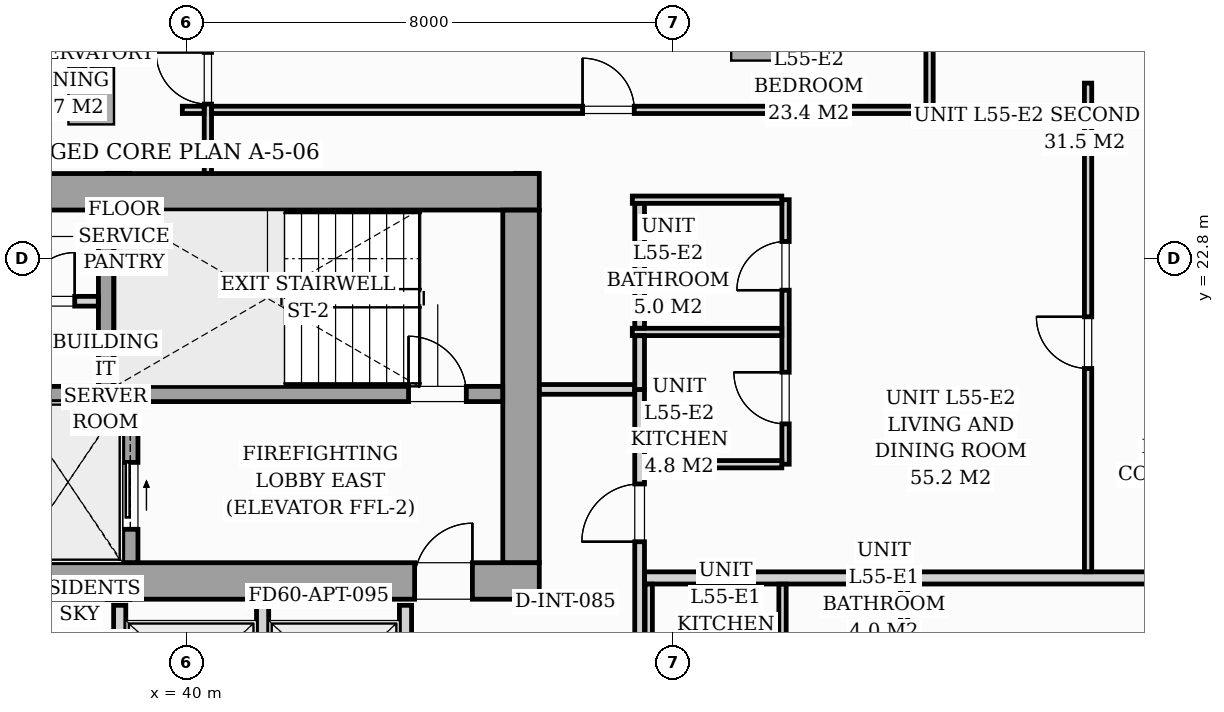
"""IFC4 building model, lengths in metres.
Left out: names, types, materials, properties, quantities, classifications, styles, units other than length and angle.
Written with IfcOpenShell. Run it as: python <this file> out.ifc"""

import sys

from ifc_helpers import new_model, si_unit, direction, frame, frame_2d, origin, origin_2d, place, context, subcontext, project, spatial, rectangle, i_section, extrude, source, transform, mapped, element, fill, save


model = new_model("IFC4")
c1 = context("Model", 3, precision=1e-05, world=origin(), true_north=direction((0.0, 1.0)))
c2 = subcontext(c1, "Body", "Model", "MODEL_VIEW")
j1 = project(units=[si_unit("LENGTHUNIT", "METRE"), si_unit("PLANEANGLEUNIT", "RADIAN")], contexts=[c1])
p1 = place(None, origin())
s1 = spatial("IfcSite", under=j1, at=p1, CompositionType="ELEMENT")
p2 = place(p1, origin())
s2 = spatial("IfcBuilding", under=s1, at=p2, CompositionType="ELEMENT")
p3 = place(p2, frame((0.0, 0.0, 192.2)))
s3 = spatial("IfcBuildingStorey", under=s2, at=p3, CompositionType="ELEMENT", Elevation=192.2)
m1 = source(origin(), c2, "Body", "SweptSolid", [
    extrude(i_section(OverallWidth=0.416, OverallDepth=0.446, WebThickness=0.039, FlangeThickness=0.063, FilletRadius=0.018, at=origin_2d()), origin(), (0.0, 0.0, 1.0), 3.196),
])
for number, where, z_axis, x_axis in (
    (1, (38.88, 17.4, 0.002), (0.0, 0.0, 1.0), (1.0, 0.0, 0.0)),
    (2, (45.6, 17.4, 0.002), (0.0, 0.0, 1.0), (1.0, 0.0, 0.0)),
    (3, (38.88, 24.0, 0.002), (0.0, 0.0, 1.0), (1.0, 0.0, 0.0)),
    (4, (45.6, 24.0, 0.002), (0.0, 0.0, 1.0), (1.0, 0.0, 0.0)),
):
    element("IfcColumn", number, at=place(p3, frame(where, z_axis=z_axis, x_axis=x_axis)), inside=s3, PredefinedType="PILASTER", context=c2, shape_type="MappedRepresentation", body=[
        mapped(m1, transform((0.0, 0.0, 0.0), scale=1.0)),
    ])
m2 = source(origin(), c2, "Body", "SweptSolid", [
    extrude(rectangle(XDim=0.75, YDim=0.95, at=origin_2d()), origin(), (0.0, 0.0, 1.0), 3.196),
])
for number, where, z_axis, x_axis in (
    (5, (38.431, 25.483, 0.002), (0.0, 0.0, 1.0), (0.995, 0.096, 0.0)),
    (6, (49.331, 26.533, 0.002), (0.0, 0.0, 1.0), (0.995, 0.096, 0.0)),
):
    element("IfcColumn", number, at=place(p3, frame(where, z_axis=z_axis, x_axis=x_axis)), inside=s3, PredefinedType="COLUMN", context=c2, shape_type="MappedRepresentation", body=[
        mapped(m2, transform((0.0, 0.0, 0.0), scale=1.0)),
    ])
p4 = place(p3, frame((26.2, 17.5, 0.0), z_axis=(0.0, 0.0, 1.0), x_axis=(1.0, 0.0, 0.0)))
e7 = element("IfcWall", 7, at=p4, inside=s3, PredefinedType="SHEAR", context=c2, shape_type="SweptSolid", body=[
    extrude(rectangle(XDim=19.6, YDim=0.6, at=frame_2d((9.8, 0.0))), origin(), (0.0, 0.0, 1.0), 3.2),
])
p5 = place(p4, frame((0.95, 0.0, 0.0)))
e8 = element("IfcOpeningElement", 8, at=p5, cuts=e7, PredefinedType="OPENING", context=c2, shape_type="SweptSolid", body=[
    extrude(rectangle(XDim=0.95, YDim=2.06, at=frame_2d((0.475, 1.03))), frame((0.0, 0.31, 0.0), z_axis=(0.0, -1.0, 0.0), x_axis=(1.0, 0.0, 0.0)), (0.0, 0.0, 1.0), 0.62),
])
p6 = place(p4, frame((9.38, 0.0, 0.0)))
e9 = element("IfcOpeningElement", 9, at=p6, cuts=e7, PredefinedType="OPENING", context=c2, shape_type="SweptSolid", body=[
    extrude(rectangle(XDim=0.85, YDim=2.0, at=frame_2d((0.425, 1.0))), frame((0.0, 0.31, 0.0), z_axis=(0.0, -1.0, 0.0), x_axis=(1.0, 0.0, 0.0)), (0.0, 0.0, 1.0), 0.62),
])
p7 = place(p4, frame((17.55, 0.0, 0.0)))
e10 = element("IfcOpeningElement", 10, at=p7, cuts=e7, PredefinedType="OPENING", context=c2, shape_type="SweptSolid", body=[
    extrude(rectangle(XDim=0.95, YDim=2.06, at=frame_2d((0.475, 1.03))), frame((0.0, 0.31, 0.0), z_axis=(0.0, -1.0, 0.0), x_axis=(1.0, 0.0, 0.0)), (0.0, 0.0, 1.0), 0.62),
])
p8 = place(p3, frame((26.2, 23.9, 0.0), z_axis=(0.0, 0.0, 1.0), x_axis=(1.0, 0.0, 0.0)))
e11 = element("IfcWall", 11, at=p8, inside=s3, PredefinedType="SHEAR", context=c2, shape_type="SweptSolid", body=[
    extrude(rectangle(XDim=19.6, YDim=0.6, at=frame_2d((9.8, 0.0))), origin(), (0.0, 0.0, 1.0), 3.2),
])
p9 = place(p3, frame((45.5, 17.802, 0.0), z_axis=(0.0, 0.0, 1.0), x_axis=(0.0, 1.0, 0.0)))
e12 = element("IfcWall", 12, at=p9, inside=s3, PredefinedType="SHEAR", context=c2, shape_type="SweptSolid", body=[
    extrude(rectangle(XDim=5.796, YDim=0.6, at=frame_2d((2.898, 0.0))), origin(), (0.0, 0.0, 1.0), 3.2),
])
p10 = place(p3, frame((37.05, 20.575, 0.0), z_axis=(0.0, 0.0, 1.0), x_axis=(1.0, 0.0, 0.0)))
e13 = element("IfcWall", 13, at=p10, inside=s3, PredefinedType="SOLIDWALL", context=c2, shape_type="SweptSolid", body=[
    extrude(rectangle(XDim=8.148, YDim=0.25, at=frame_2d((4.074, 0.0))), origin(), (0.0, 0.0, 1.0), 3.2),
])
p11 = place(p10, frame((6.6, 0.0, 0.0)))
e14 = element("IfcOpeningElement", 14, at=p11, cuts=e13, PredefinedType="OPENING", context=c2, shape_type="SweptSolid", body=[
    extrude(rectangle(XDim=0.95, YDim=2.06, at=frame_2d((0.475, 1.03))), frame((0.0, 0.135, 0.0), z_axis=(0.0, -1.0, 0.0), x_axis=(1.0, 0.0, 0.0)), (0.0, 0.0, 1.0), 0.27),
])
p12 = place(p3, frame((38.675, 20.702, 0.0), z_axis=(0.0, 0.0, 1.0), x_axis=(0.0, 1.0, 0.0)))
e15 = element("IfcWall", 15, at=p12, inside=s3, PredefinedType="SOLIDWALL", context=c2, shape_type="SweptSolid", body=[
    extrude(rectangle(XDim=2.896, YDim=0.25, at=frame_2d((1.448, 0.0))), origin(), (0.0, 0.0, 1.0), 3.2),
])
p13 = place(p3, frame((39.075, 17.802, 0.0), z_axis=(0.0, 0.0, 1.0), x_axis=(0.0, 1.0, 0.0)))
e16 = element("IfcWall", 16, at=p13, inside=s3, PredefinedType="SOLIDWALL", context=c2, shape_type="SweptSolid", body=[
    extrude(rectangle(XDim=2.646, YDim=0.25, at=frame_2d((1.323, 0.0))), origin(), (0.0, 0.0, 1.0), 3.2),
])
p14 = place(p13, frame((0.548, 0.0, 0.0)))
e17 = element("IfcOpeningElement", 17, at=p14, cuts=e16, PredefinedType="OPENING", context=c2, shape_type="SweptSolid", body=[
    extrude(rectangle(XDim=1.1, YDim=2.08, at=frame_2d((0.55, 1.04))), frame((0.0, 0.135, 0.0), z_axis=(0.0, -1.0, 0.0), x_axis=(1.0, 0.0, 0.0)), (0.0, 0.0, 1.0), 0.27),
])
p15 = place(p3, frame((33.452, 22.1, 0.0), z_axis=(0.0, 0.0, 1.0), x_axis=(1.0, 0.0, 0.0)))
e18 = element("IfcWall", 18, at=p15, inside=s3, PredefinedType="PARTITIONING", context=c2, shape_type="SweptSolid", body=[
    extrude(rectangle(XDim=5.096, YDim=0.16, at=frame_2d((2.548, 0.0))), origin(), (0.0, 0.0, 1.0), 2.94),
])
p16 = place(p15, frame((0.388, 0.0, 0.0)))
e19 = element("IfcOpeningElement", 19, at=p16, cuts=e18, PredefinedType="OPENING", context=c2, shape_type="SweptSolid", body=[
    extrude(rectangle(XDim=0.8, YDim=2.05, at=frame_2d((0.4, 1.025))), frame((0.0, 0.09, 0.0), z_axis=(0.0, -1.0, 0.0), x_axis=(1.0, 0.0, 0.0)), (0.0, 0.0, 1.0), 0.18),
])
p17 = place(p15, frame((2.148, 0.0, 0.0)))
e20 = element("IfcOpeningElement", 20, at=p17, cuts=e18, PredefinedType="OPENING", context=c2, shape_type="SweptSolid", body=[
    extrude(rectangle(XDim=0.8, YDim=2.05, at=frame_2d((0.4, 1.025))), frame((0.0, 0.09, 0.0), z_axis=(0.0, -1.0, 0.0), x_axis=(1.0, 0.0, 0.0)), (0.0, 0.0, 1.0), 0.18),
])
p18 = place(p15, frame((3.908, 0.0, 0.0)))
e21 = element("IfcOpeningElement", 21, at=p18, cuts=e18, PredefinedType="OPENING", context=c2, shape_type="SweptSolid", body=[
    extrude(rectangle(XDim=0.8, YDim=2.05, at=frame_2d((0.4, 1.025))), frame((0.0, 0.09, 0.0), z_axis=(0.0, -1.0, 0.0), x_axis=(1.0, 0.0, 0.0)), (0.0, 0.0, 1.0), 0.18),
])
for number, where, z_axis, x_axis in (
    (22, (38.9, 14.75, 0.0), (0.0, 0.0, 1.0), (0.0, 1.0, 0.0)),
    (23, (41.25, 14.75, 0.0), (0.0, 0.0, 1.0), (0.0, 1.0, 0.0)),
    (24, (43.6, 14.75, 0.0), (0.0, 0.0, 1.0), (0.0, 1.0, 0.0)),
):
    element("IfcWall", number, at=place(p3, frame(where, z_axis=z_axis, x_axis=x_axis)), inside=s3, PredefinedType="PARTITIONING", context=c2, shape_type="SweptSolid", body=[
        extrude(rectangle(XDim=2.35, YDim=0.2, at=frame_2d((1.175, 0.0))), origin(), (0.0, 0.0, 1.0), 2.94),
    ])
p19 = place(p3, frame((47.45, 13.362, 0.0), z_axis=(0.0, 0.0, 1.0), x_axis=(0.0, 1.0, 0.0)))
e25 = element("IfcWall", 25, at=p19, inside=s3, PredefinedType="PARTITIONING", context=c2, shape_type="SweptSolid", body=[
    extrude(rectangle(XDim=7.288, YDim=0.16, at=frame_2d((3.644, 0.0))), origin(), (0.0, 0.0, 1.0), 2.94),
])
p20 = place(p19, frame((0.493, 0.0, 0.0)))
e26 = element("IfcOpeningElement", 26, at=p20, cuts=e25, PredefinedType="OPENING", context=c2, shape_type="SweptSolid", body=[
    extrude(rectangle(XDim=0.95, YDim=2.06, at=frame_2d((0.475, 1.03))), frame((0.0, 0.09, 0.0), z_axis=(0.0, -1.0, 0.0), x_axis=(1.0, 0.0, 0.0)), (0.0, 0.0, 1.0), 0.18),
])
p21 = place(p19, frame((4.783, 0.0, 0.0)))
e27 = element("IfcOpeningElement", 27, at=p21, cuts=e25, PredefinedType="OPENING", context=c2, shape_type="SweptSolid", body=[
    extrude(rectangle(XDim=0.95, YDim=2.06, at=frame_2d((0.475, 1.03))), frame((0.0, 0.09, 0.0), z_axis=(0.0, -1.0, 0.0), x_axis=(1.0, 0.0, 0.0)), (0.0, 0.0, 1.0), 0.18),
])
p22 = place(p3, frame((45.802, 20.65, 0.0), z_axis=(0.0, 0.0, 1.0), x_axis=(1.0, 0.0, 0.0)))
e28 = element("IfcWall", 28, at=p22, inside=s3, PredefinedType="PARTITIONING", context=c2, shape_type="SweptSolid", body=[
    extrude(rectangle(XDim=1.566, YDim=0.16, at=frame_2d((0.783, 0.0))), origin(), (0.0, 0.0, 1.0), 2.94),
])
p23 = place(p3, frame((47.532, 17.55, 0.0), z_axis=(0.0, 0.0, 1.0), x_axis=(1.0, 0.0, 0.0)))
e29 = element("IfcWall", 29, at=p23, inside=s3, PredefinedType="PARTITIONING", context=c2, shape_type="SweptSolid", body=[
    extrude(rectangle(XDim=17.201, YDim=0.2, at=frame_2d((8.601, 0.0))), origin(), (0.0, 0.0, 1.0), 2.281),
])
for number, where, z_axis, x_axis in (
    (30, (47.6, 15.262, 0.0), (0.0, 0.0, 1.0), (0.0, 1.0, 0.0)),
    (31, (49.8, 15.262, 0.0), (0.0, 0.0, 1.0), (0.0, 1.0, 0.0)),
    (32, (51.8, 15.262, 0.0), (0.0, 0.0, 1.0), (0.0, 1.0, 0.0)),
):
    element("IfcWall", number, at=place(p3, frame(where, z_axis=z_axis, x_axis=x_axis)), inside=s3, PredefinedType="PARTITIONING", context=c2, shape_type="SweptSolid", body=[
        extrude(rectangle(XDim=2.186, YDim=0.12, at=frame_2d((1.093, 0.0))), origin(), (0.0, 0.0, 1.0), 2.94),
    ])
p24 = place(p3, frame((49.85, 19.42, 0.0), z_axis=(0.0, 0.0, 1.0), x_axis=(0.0, 1.0, 0.0)))
e33 = element("IfcWall", 33, at=p24, inside=s3, PredefinedType="PARTITIONING", context=c2, shape_type="SweptSolid", body=[
    extrude(rectangle(XDim=4.35, YDim=0.12, at=frame_2d((2.175, 0.0))), origin(), (0.0, 0.0, 1.0), 2.94),
])
p25 = place(p24, frame((0.663, 0.0, 0.0)))
e34 = element("IfcOpeningElement", 34, at=p25, cuts=e33, PredefinedType="OPENING", context=c2, shape_type="SweptSolid", body=[
    extrude(rectangle(XDim=0.85, YDim=2.05, at=frame_2d((0.425, 1.025))), frame((0.0, 0.07, 0.0), z_axis=(0.0, -1.0, 0.0), x_axis=(1.0, 0.0, 0.0)), (0.0, 0.0, 1.0), 0.14),
])
p26 = place(p24, frame((2.862, 0.0, 0.0)))
e35 = element("IfcOpeningElement", 35, at=p26, cuts=e33, PredefinedType="OPENING", context=c2, shape_type="SweptSolid", body=[
    extrude(rectangle(XDim=0.8, YDim=2.02, at=frame_2d((0.4, 1.01))), frame((0.0, 0.07, 0.0), z_axis=(0.0, -1.0, 0.0), x_axis=(1.0, 0.0, 0.0)), (0.0, 0.0, 1.0), 0.14),
])
p27 = place(p3, frame((47.33, 21.595, 0.0), z_axis=(0.0, 0.0, 1.0), x_axis=(1.0, 0.0, 0.0)))
e36 = element("IfcWall", 36, at=p27, inside=s3, PredefinedType="PARTITIONING", context=c2, shape_type="SweptSolid", body=[
    extrude(rectangle(XDim=2.458, YDim=0.12, at=frame_2d((1.229, 0.0))), origin(), (0.0, 0.0, 1.0), 2.94),
])
p28 = place(p3, frame((47.532, 19.42, 0.0), z_axis=(0.0, 0.0, 1.0), x_axis=(1.0, 0.0, 0.0)))
e37 = element("IfcWall", 37, at=p28, inside=s3, PredefinedType="PARTITIONING", context=c2, shape_type="SweptSolid", body=[
    extrude(rectangle(XDim=2.256, YDim=0.12, at=frame_2d((1.128, 0.0))), origin(), (0.0, 0.0, 1.0), 2.94),
])
p29 = place(p3, frame((47.33, 23.77, 0.0), z_axis=(0.0, 0.0, 1.0), x_axis=(1.0, 0.0, 0.0)))
e38 = element("IfcWall", 38, at=p29, inside=s3, PredefinedType="PARTITIONING", context=c2, shape_type="SweptSolid", body=[
    extrude(rectangle(XDim=2.458, YDim=0.12, at=frame_2d((1.229, 0.0))), origin(), (0.0, 0.0, 1.0), 2.94),
])
p30 = place(p3, frame((47.45, 20.65, 0.0), z_axis=(0.0, 0.0, 1.0), x_axis=(0.0, 1.0, 0.0)))
e39 = element("IfcWall", 39, at=p30, inside=s3, PredefinedType="PARTITIONING", context=c2, shape_type="SweptSolid", body=[
    extrude(rectangle(XDim=0.883, YDim=0.16, at=frame_2d((0.441, 0.0))), origin(), (0.0, 0.0, 1.0), 2.94),
])
p31 = place(p3, frame((47.45, 21.657, 0.0), z_axis=(0.0, 0.0, 1.0), x_axis=(0.0, 1.0, 0.0)))
e40 = element("IfcWall", 40, at=p31, inside=s3, PredefinedType="PARTITIONING", context=c2, shape_type="SweptSolid", body=[
    extrude(rectangle(XDim=2.051, YDim=0.16, at=frame_2d((1.025, 0.0))), origin(), (0.0, 0.0, 1.0), 2.94),
])
p32 = place(p3, frame((40.35, 24.202, 0.0), z_axis=(0.0, 0.0, 1.0), x_axis=(0.0, 1.0, 0.0)))
e41 = element("IfcWall", 41, at=p32, inside=s3, PredefinedType="PARTITIONING", context=c2, shape_type="SweptSolid", body=[
    extrude(rectangle(XDim=2.571, YDim=0.12, at=frame_2d((1.286, 0.0))), origin(), (0.0, 0.0, 1.0), 2.94),
])
p33 = place(p32, frame((1.14, 0.0, 0.0)))
e42 = element("IfcOpeningElement", 42, at=p33, cuts=e41, PredefinedType="OPENING", context=c2, shape_type="SweptSolid", body=[
    extrude(rectangle(XDim=0.85, YDim=2.05, at=frame_2d((0.425, 1.025))), frame((0.0, 0.07, 0.0), z_axis=(0.0, -1.0, 0.0), x_axis=(1.0, 0.0, 0.0)), (0.0, 0.0, 1.0), 0.14),
])
p34 = place(p3, frame((52.218, 25.247, 0.0), z_axis=(0.0, 0.0, 1.0), x_axis=(0.0, 1.0, 0.0)))
e43 = element("IfcWall", 43, at=p34, inside=s3, PredefinedType="PARTITIONING", context=c2, shape_type="SweptSolid", body=[
    extrude(rectangle(XDim=2.486, YDim=0.12, at=frame_2d((1.243, 0.0))), origin(), (0.0, 0.0, 1.0), 2.94),
])
p35 = place(p3, frame((39.93, 25.247, 0.0), z_axis=(0.0, 0.0, 1.0), x_axis=(1.0, 0.0, 0.0)))
e44 = element("IfcWall", 44, at=p35, inside=s3, PredefinedType="PARTITIONING", context=c2, shape_type="SweptSolid", body=[
    extrude(rectangle(XDim=0.358, YDim=0.12, at=frame_2d((0.179, 0.0))), origin(), (0.0, 0.0, 1.0), 2.94),
])
p36 = place(p3, frame((40.412, 25.247, 0.0), z_axis=(0.0, 0.0, 1.0), x_axis=(1.0, 0.0, 0.0)))
e45 = element("IfcWall", 45, at=p36, inside=s3, PredefinedType="PARTITIONING", context=c2, shape_type="SweptSolid", body=[
    extrude(rectangle(XDim=11.744, YDim=0.12, at=frame_2d((5.872, 0.0))), origin(), (0.0, 0.0, 1.0), 2.94),
])
p37 = place(p36, frame((6.1, 0.0, 0.0)))
e46 = element("IfcOpeningElement", 46, at=p37, cuts=e45, PredefinedType="OPENING", context=c2, shape_type="SweptSolid", body=[
    extrude(rectangle(XDim=0.85, YDim=2.05, at=frame_2d((0.425, 1.025))), frame((0.0, 0.07, 0.0), z_axis=(0.0, -1.0, 0.0), x_axis=(1.0, 0.0, 0.0)), (0.0, 0.0, 1.0), 0.14),
])
p38 = place(p3, frame((52.28, 25.247, 0.0), z_axis=(0.0, 0.0, 1.0), x_axis=(1.0, 0.0, 0.0)))
e47 = element("IfcWall", 47, at=p38, inside=s3, PredefinedType="PARTITIONING", context=c2, shape_type="SweptSolid", body=[
    extrude(rectangle(XDim=11.712, YDim=0.12, at=frame_2d((5.856, 0.0))), origin(), (0.0, 0.0, 1.0), 2.94),
])
p39 = place(p38, frame((5.247, 0.0, 0.0)))
e48 = element("IfcOpeningElement", 48, at=p39, cuts=e47, PredefinedType="OPENING", context=c2, shape_type="SweptSolid", body=[
    extrude(rectangle(XDim=0.85, YDim=2.05, at=frame_2d((0.425, 1.025))), frame((0.0, 0.07, 0.0), z_axis=(0.0, -1.0, 0.0), x_axis=(1.0, 0.0, 0.0)), (0.0, 0.0, 1.0), 0.14),
])
p40 = place(p3, frame((54.825, 17.652, 0.0), z_axis=(0.0, 0.0, 1.0), x_axis=(0.0, 1.0, 0.0)))
e49 = element("IfcWall", 49, at=p40, inside=s3, PredefinedType="PARTITIONING", context=c2, shape_type="SweptSolid", body=[
    extrude(rectangle(XDim=7.533, YDim=0.12, at=frame_2d((3.767, 0.0))), origin(), (0.0, 0.0, 1.0), 2.94),
])
p41 = place(p40, frame((3.342, 0.0, 0.0)))
e50 = element("IfcOpeningElement", 50, at=p41, cuts=e49, PredefinedType="OPENING", context=c2, shape_type="SweptSolid", body=[
    extrude(rectangle(XDim=0.85, YDim=2.05, at=frame_2d((0.425, 1.025))), frame((0.0, 0.07, 0.0), z_axis=(0.0, -1.0, 0.0), x_axis=(1.0, 0.0, 0.0)), (0.0, 0.0, 1.0), 0.14),
])
p42 = place(p3, frame((54.825, 25.309, 0.0), z_axis=(0.0, 0.0, 1.0), x_axis=(0.0, 1.0, 0.0)))
e51 = element("IfcWall", 51, at=p42, inside=s3, PredefinedType="PARTITIONING", context=c2, shape_type="SweptSolid", body=[
    extrude(rectangle(XDim=0.378, YDim=0.12, at=frame_2d((0.189, 0.0))), origin(), (0.0, 0.0, 1.0), 2.94),
])
p43 = place(p3, frame((38.395, 25.861, 0.0), z_axis=(0.0, 0.0, 1.0), x_axis=(-0.095977354523, 0.995383517755, 0.0)))
e52 = element("IfcWall", 52, at=p43, inside=s3, PredefinedType="PARTITIONING", context=c2, shape_type="SweptSolid", body=[
    extrude(rectangle(XDim=0.72, YDim=0.12, at=frame_2d((0.36, 0.0))), origin(), (0.0, 0.0, 1.0), 2.94),
])
m3 = source(origin(), c2, "Body", "SweptSolid", [
    extrude(rectangle(XDim=0.95, YDim=2.06, at=frame_2d((0.475, 1.03))), frame((0.0, 0.025, 0.0), z_axis=(0.0, -1.0, 0.0), x_axis=(1.0, 0.0, 0.0)), (0.0, 0.0, 1.0), 0.05),
])
p44 = place(p7, origin())
e53 = element("IfcDoor", 53, at=p44, inside=s3, OperationType="SINGLE_SWING_RIGHT", PredefinedType="DOOR", context=c2, shape_type="MappedRepresentation", body=[
    mapped(m3, transform((0.0, 0.0, 0.0), scale=1.0)),
])
fill(e10, e53)
p45 = place(p11, origin())
e54 = element("IfcDoor", 54, at=p45, inside=s3, OperationType="SINGLE_SWING_LEFT", PredefinedType="DOOR", context=c2, shape_type="MappedRepresentation", body=[
    mapped(m3, transform((0.0, 0.0, 0.0), scale=1.0)),
])
fill(e14, e54)
m4 = source(origin(), c2, "Body", "SweptSolid", [
    extrude(rectangle(XDim=1.1, YDim=2.08, at=frame_2d((0.55, 1.04))), frame((0.0, 0.025, 0.0), z_axis=(0.0, -1.0, 0.0), x_axis=(1.0, 0.0, 0.0)), (0.0, 0.0, 1.0), 0.05),
])
p46 = place(p14, origin())
e55 = element("IfcDoor", 55, at=p46, inside=s3, OperationType="SLIDING_TO_RIGHT", PredefinedType="DOOR", context=c2, shape_type="MappedRepresentation", body=[
    mapped(m4, transform((0.0, 0.0, 0.0), scale=1.0)),
])
fill(e17, e55)
m5 = source(origin(), c2, "Body", "SweptSolid", [
    extrude(rectangle(XDim=0.8, YDim=2.05, at=frame_2d((0.4, 1.025))), frame((0.0, 0.025, 0.0), z_axis=(0.0, -1.0, 0.0), x_axis=(1.0, 0.0, 0.0)), (0.0, 0.0, 1.0), 0.05),
])
p47 = place(p18, origin())
e56 = element("IfcDoor", 56, at=p47, inside=s3, OperationType="SINGLE_SWING_RIGHT", PredefinedType="DOOR", context=c2, shape_type="MappedRepresentation", body=[
    mapped(m5, transform((0.0, 0.0, 0.0), scale=1.0)),
])
fill(e21, e56)
m6 = source(origin(), c2, "Body", "SweptSolid", [
    extrude(rectangle(XDim=0.95, YDim=2.06, at=frame_2d((0.475, 1.03))), frame((0.0, 0.025, 0.0), z_axis=(0.0, -1.0, 0.0), x_axis=(1.0, 0.0, 0.0)), (0.0, 0.0, 1.0), 0.05),
])
p48 = place(p21, origin())
e57 = element("IfcDoor", 57, at=p48, inside=s3, OperationType="SINGLE_SWING_LEFT", PredefinedType="DOOR", context=c2, shape_type="MappedRepresentation", body=[
    mapped(m6, transform((0.0, 0.0, 0.0), scale=1.0)),
])
fill(e27, e57)
m7 = source(origin(), c2, "Body", "SweptSolid", [
    extrude(rectangle(XDim=0.85, YDim=2.05, at=frame_2d((0.425, 1.025))), frame((0.0, 0.025, 0.0), z_axis=(0.0, -1.0, 0.0), x_axis=(1.0, 0.0, 0.0)), (0.0, 0.0, 1.0), 0.05),
])
p49 = place(p25, origin())
e58 = element("IfcDoor", 58, at=p49, inside=s3, OperationType="SINGLE_SWING_RIGHT", PredefinedType="DOOR", context=c2, shape_type="MappedRepresentation", body=[
    mapped(m7, transform((0.0, 0.0, 0.0), scale=1.0)),
])
fill(e34, e58)
m8 = source(origin(), c2, "Body", "SweptSolid", [
    extrude(rectangle(XDim=0.8, YDim=2.02, at=frame_2d((0.4, 1.01))), frame((0.0, 0.025, 0.0), z_axis=(0.0, -1.0, 0.0), x_axis=(1.0, 0.0, 0.0)), (0.0, 0.0, 1.0), 0.05),
])
p50 = place(p26, origin())
e59 = element("IfcDoor", 59, at=p50, inside=s3, OperationType="SINGLE_SWING_LEFT", PredefinedType="DOOR", context=c2, shape_type="MappedRepresentation", body=[
    mapped(m8, transform((0.0, 0.0, 0.0), scale=1.0)),
])
fill(e35, e59)
p51 = place(p33, origin())
e60 = element("IfcDoor", 60, at=p51, inside=s3, OperationType="SINGLE_SWING_RIGHT", PredefinedType="DOOR", context=c2, shape_type="MappedRepresentation", body=[
    mapped(m7, transform((0.0, 0.0, 0.0), scale=1.0)),
])
fill(e42, e60)
p52 = place(p37, origin())
e61 = element("IfcDoor", 61, at=p52, inside=s3, OperationType="SINGLE_SWING_LEFT", PredefinedType="DOOR", context=c2, shape_type="MappedRepresentation", body=[
    mapped(m7, transform((0.0, 0.0, 0.0), scale=1.0)),
])
fill(e46, e61)
p53 = place(p41, origin())
e62 = element("IfcDoor", 62, at=p53, inside=s3, OperationType="SINGLE_SWING_RIGHT", PredefinedType="DOOR", context=c2, shape_type="MappedRepresentation", body=[
    mapped(m7, transform((0.0, 0.0, 0.0), scale=1.0)),
])
fill(e50, e62)
save(model, sys.argv[1])
